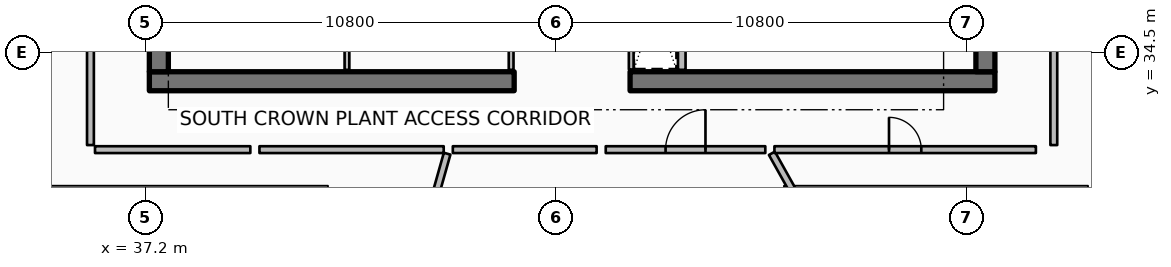
"""IFC4 building model, lengths in metres.
Left out: names, types, materials, properties, quantities, classifications, styles, units other than length and angle.
Written with IfcOpenShell. Run it as: python <this file> out.ifc"""

import sys

from ifc_helpers import new_model, si_unit, direction, frame, frame_2d, origin, place, context, subcontext, project, spatial, rectangle, extrude, element, fill, save


model = new_model("IFC4")
c1 = context("Model", 3, precision=1e-05, world=origin(), true_north=direction((0.0, 1.0)))
c2 = subcontext(c1, "Body", "Model", "MODEL_VIEW")
j1 = project(units=[si_unit("LENGTHUNIT", "METRE"), si_unit("PLANEANGLEUNIT", "RADIAN")], contexts=[c1])
p1 = place(None, origin())
s1 = spatial("IfcSite", under=j1, at=p1, CompositionType="ELEMENT")
p2 = place(p1, origin())
s2 = spatial("IfcBuilding", under=s1, at=p2, CompositionType="ELEMENT")
p3 = place(p2, frame((0.0, 0.0, 370.4)))
s3 = spatial("IfcBuildingStorey", under=s2, at=p3, CompositionType="ELEMENT", Elevation=370.4)
p4 = place(p3, frame((37.3, 33.75, 0.0), z_axis=(0.0, 0.0, 1.0), x_axis=(1.0, 0.0, 0.0)))
e1 = element("IfcWall", 1, at=p4, inside=s3, PredefinedType="SHEAR", context=c2, shape_type="SweptSolid", body=[
    extrude(rectangle(XDim=9.6, YDim=0.5, at=frame_2d((4.8, 0.0))), origin(), (0.0, 0.0, 1.0), 3.6),
])
p5 = place(p3, frame((49.95, 33.75, 0.0), z_axis=(0.0, 0.0, 1.0), x_axis=(1.0, 0.0, 0.0)))
e2 = element("IfcWall", 2, at=p5, inside=s3, PredefinedType="SHEAR", context=c2, shape_type="SweptSolid", body=[
    extrude(rectangle(XDim=9.6, YDim=0.5, at=frame_2d((4.8, 0.0))), origin(), (0.0, 0.0, 1.0), 3.6),
])
for number, where, z_axis, x_axis in (
    (3, (37.55, 34.0, 0.0), (0.0, 0.0, 1.0), (0.0, 1.0, 0.0)),
    (4, (59.3, 34.0, 0.0), (0.0, 0.0, 1.0), (0.0, 1.0, 0.0)),
):
    element("IfcWall", number, at=place(p3, frame(where, z_axis=z_axis, x_axis=x_axis)), inside=s3, PredefinedType="SHEAR", context=c2, shape_type="SweptSolid", body=[
        extrude(rectangle(XDim=16.0, YDim=0.5, at=frame_2d((8.0, 0.0))), origin(), (0.0, 0.0, 1.0), 3.6),
    ])
p6 = place(p3, frame((51.31, 34.05, 0.0), z_axis=(0.0, 0.0, 1.0), x_axis=(0.0, 1.0, 0.0)))
e5 = element("IfcWall", 5, at=p6, inside=s3, PredefinedType="PARTITIONING", context=c2, shape_type="SweptSolid", body=[
    extrude(rectangle(XDim=3.21, YDim=0.2, at=frame_2d((1.605, 0.0))), origin(), (0.0, 0.0, 1.0), 3.32),
])
for number, where, z_axis, x_axis in (
    (6, (46.82, 34.05, 0.0), (0.0, 0.0, 1.0), (0.0, 1.0, 0.0)),
    (7, (42.5, 34.05, 0.0), (0.0, 0.0, 1.0), (0.0, 1.0, 0.0)),
):
    element("IfcWall", number, at=place(p3, frame(where, z_axis=z_axis, x_axis=x_axis)), inside=s3, PredefinedType="PARTITIONING", context=c2, shape_type="SweptSolid", body=[
        extrude(rectangle(XDim=2.03, YDim=0.125, at=frame_2d((1.015, 0.0))), origin(), (0.0, 0.0, 1.0), 2.76),
    ])
p7 = place(p3, frame((49.98, 34.06, 0.0), z_axis=(0.0, 0.0, 1.0), x_axis=(0.0, 1.0, 0.0)))
e8 = element("IfcWall", 8, at=p7, inside=s3, PredefinedType="PARTITIONING", context=c2, shape_type="SweptSolid", body=[
    extrude(rectangle(XDim=3.4, YDim=0.125, at=frame_2d((1.7, 0.0))), origin(), (0.0, 0.0, 1.0), 2.76),
])
p8 = place(p3, frame((29.533, 31.57, 0.0), z_axis=(0.0, 0.0, 1.0), x_axis=(0.719364153135, -0.694633151516, 0.0)))
e9 = element("IfcWall", 9, at=p8, inside=s3, PredefinedType="PARTITIONING", context=c2, shape_type="SweptSolid", body=[
    extrude(rectangle(XDim=8.006, YDim=0.18, at=frame_2d((4.003, 0.0))), origin(), (0.0, 0.0, 1.0), 2.76),
])
p9 = place(p3, frame((35.75, 35.02, 0.0), z_axis=(0.0, 0.0, 1.0), x_axis=(0.0, -1.0, 0.0)))
e10 = element("IfcWall", 10, at=p9, inside=s3, PredefinedType="PARTITIONING", context=c2, shape_type="SweptSolid", body=[
    extrude(rectangle(XDim=2.95, YDim=0.18, at=frame_2d((1.475, 0.0))), origin(), (0.0, 0.0, 1.0), 2.76),
])
p10 = place(p3, frame((35.87, 31.95, 0.0), z_axis=(0.0, 0.0, 1.0), x_axis=(1.0, 0.0, 0.0)))
e11 = element("IfcWall", 11, at=p10, inside=s3, PredefinedType="PARTITIONING", context=c2, shape_type="SweptSolid", body=[
    extrude(rectangle(XDim=4.087, YDim=0.18, at=frame_2d((2.043, 0.0))), origin(), (0.0, 0.0, 1.0), 2.76),
])
p11 = place(p3, frame((40.197, 31.95, 0.0), z_axis=(0.0, 0.0, 1.0), x_axis=(1.0, 0.0, 0.0)))
e12 = element("IfcWall", 12, at=p11, inside=s3, PredefinedType="PARTITIONING", context=c2, shape_type="SweptSolid", body=[
    extrude(rectangle(XDim=4.848, YDim=0.18, at=frame_2d((2.424, 0.0))), origin(), (0.0, 0.0, 1.0), 2.76),
])
p12 = place(p3, frame((45.136, 31.844, 0.0), z_axis=(0.0, 0.0, 1.0), x_axis=(-0.271457285698, -0.962450488099, 0.0)))
e13 = element("IfcWall", 13, at=p12, inside=s3, PredefinedType="PARTITIONING", context=c2, shape_type="SweptSolid", body=[
    extrude(rectangle(XDim=8.056, YDim=0.18, at=frame_2d((4.028, 0.0))), origin(), (0.0, 0.0, 1.0), 2.76),
])
p13 = place(p3, frame((45.286, 31.95, 0.0), z_axis=(0.0, 0.0, 1.0), x_axis=(1.0, 0.0, 0.0)))
e14 = element("IfcWall", 14, at=p13, inside=s3, PredefinedType="PARTITIONING", context=c2, shape_type="SweptSolid", body=[
    extrude(rectangle(XDim=3.784, YDim=0.18, at=frame_2d((1.892, 0.0))), origin(), (0.0, 0.0, 1.0), 2.76),
])
p14 = place(p3, frame((49.31, 31.95, 0.0), z_axis=(0.0, 0.0, 1.0), x_axis=(1.0, 0.0, 0.0)))
e15 = element("IfcWall", 15, at=p14, inside=s3, PredefinedType="PARTITIONING", context=c2, shape_type="SweptSolid", body=[
    extrude(rectangle(XDim=4.199, YDim=0.18, at=frame_2d((2.099, 0.0))), origin(), (0.0, 0.0, 1.0), 2.76),
])
p15 = place(p14, frame((1.574, 0.0, 0.0)))
e16 = element("IfcOpeningElement", 16, at=p15, cuts=e15, PredefinedType="OPENING", context=c2, shape_type="SweptSolid", body=[
    extrude(rectangle(XDim=1.05, YDim=2.1, at=frame_2d((0.525, 1.05))), frame((0.0, 0.1, 0.0), z_axis=(0.0, -1.0, 0.0), x_axis=(1.0, 0.0, 0.0)), (0.0, 0.0, 1.0), 0.2),
])
p16 = place(p3, frame((53.682, 31.854, 0.0), z_axis=(0.0, 0.0, 1.0), x_axis=(0.488622869326, -0.872495095443, 0.0)))
e17 = element("IfcWall", 17, at=p16, inside=s3, PredefinedType="PARTITIONING", context=c2, shape_type="SweptSolid", body=[
    extrude(rectangle(XDim=5.337, YDim=0.18, at=frame_2d((2.668, 0.0))), origin(), (0.0, 0.0, 1.0), 2.76),
])
p17 = place(p3, frame((53.748, 31.95, 0.0), z_axis=(0.0, 0.0, 1.0), x_axis=(1.0, 0.0, 0.0)))
e18 = element("IfcWall", 18, at=p17, inside=s3, PredefinedType="PARTITIONING", context=c2, shape_type="SweptSolid", body=[
    extrude(rectangle(XDim=6.88, YDim=0.18, at=frame_2d((3.44, 0.0))), origin(), (0.0, 0.0, 1.0), 2.76),
])
p18 = place(p17, frame((3.015, 0.0, 0.0)))
e19 = element("IfcOpeningElement", 19, at=p18, cuts=e18, PredefinedType="OPENING", context=c2, shape_type="SweptSolid", body=[
    extrude(rectangle(XDim=0.85, YDim=2.06, at=frame_2d((0.425, 1.03))), frame((0.0, 0.1, 0.0), z_axis=(0.0, -1.0, 0.0), x_axis=(1.0, 0.0, 0.0)), (0.0, 0.0, 1.0), 0.2),
])
p19 = place(p3, frame((61.1, 32.07, 0.0), z_axis=(0.0, 0.0, 1.0), x_axis=(0.0, 1.0, 0.0)))
e20 = element("IfcWall", 20, at=p19, inside=s3, PredefinedType="PARTITIONING", context=c2, shape_type="SweptSolid", body=[
    extrude(rectangle(XDim=6.115, YDim=0.18, at=frame_2d((3.058, 0.0))), origin(), (0.0, 0.0, 1.0), 2.76),
])
p20 = place(p15, origin())
e21 = element("IfcDoor", 21, at=p20, inside=s3, OperationType="SINGLE_SWING_RIGHT", PredefinedType="DOOR", context=c2, shape_type="SweptSolid", body=[
    extrude(rectangle(XDim=1.05, YDim=2.1, at=frame_2d((0.525, 1.05))), frame((0.0, 0.025, 0.0), z_axis=(0.0, -1.0, 0.0), x_axis=(1.0, 0.0, 0.0)), (0.0, 0.0, 1.0), 0.05),
])
fill(e16, e21)
p21 = place(p18, origin())
e22 = element("IfcDoor", 22, at=p21, inside=s3, OperationType="SINGLE_SWING_LEFT", PredefinedType="DOOR", context=c2, shape_type="SweptSolid", body=[
    extrude(rectangle(XDim=0.85, YDim=2.06, at=frame_2d((0.425, 1.03))), frame((0.0, 0.025, 0.0), z_axis=(0.0, -1.0, 0.0), x_axis=(1.0, 0.0, 0.0)), (0.0, 0.0, 1.0), 0.05),
])
fill(e19, e22)
save(model, sys.argv[1])
